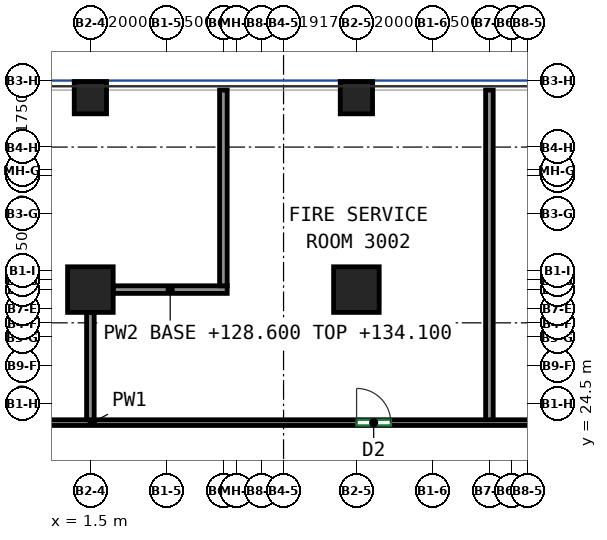
"""IFC4 building model, lengths in metres.
Left out: names, types, materials, properties, quantities, classifications, styles, units other than length and angle.
Written with IfcOpenShell. Run it as: python <this file> out.ifc"""

import sys

from ifc_helpers import new_model, si_unit, direction, frame, frame_2d, origin, origin_2d, place, context, subcontext, project, spatial, rectangle, extrude, source, transform, mapped, element, fill, save


model = new_model("IFC4")
c1 = context("Model", 3, precision=1e-05, world=origin(), true_north=direction((0.0, 1.0)))
c2 = subcontext(c1, "Body", "Model", "MODEL_VIEW")
j1 = project(units=[si_unit("LENGTHUNIT", "METRE"), si_unit("PLANEANGLEUNIT", "RADIAN")], contexts=[c1])
p1 = place(None, origin())
s1 = spatial("IfcSite", under=j1, at=p1, CompositionType="ELEMENT")
p2 = place(p1, origin())
s2 = spatial("IfcBuilding", under=s1, at=p2, CompositionType="ELEMENT")
p3 = place(p2, frame((0.0, 0.0, 128.6)))
s3 = spatial("IfcBuildingStorey", under=s2, at=p3, CompositionType="ELEMENT", Elevation=128.6)
m1 = source(origin(), c2, "Body", "SweptSolid", [
    extrude(rectangle(XDim=1.2, YDim=1.2, at=origin_2d()), origin(), (0.0, 0.0, 1.0), 5.5),
])
p4 = place(p3, frame((1.5, 27.5, 0.0), z_axis=(0.0, 0.0, 1.0), x_axis=(1.0, 0.0, 0.0)))
e1 = element("IfcColumn", 1, at=p4, inside=s3, PredefinedType="COLUMN", context=c2, shape_type="MappedRepresentation", body=[
    mapped(m1, transform((0.0, 0.0, 0.0))),
])
m2 = source(origin(), c2, "Body", "SweptSolid", [
    extrude(rectangle(XDim=0.85, YDim=0.85, at=origin_2d()), origin(), (0.0, 0.0, 1.0), 5.5),
])
p5 = place(p3, frame((1.5, 32.55, 0.0), z_axis=(0.0, 0.0, 1.0), x_axis=(1.0, 0.0, 0.0)))
e2 = element("IfcColumn", 2, at=p5, inside=s3, PredefinedType="COLUMN", context=c2, shape_type="MappedRepresentation", body=[
    mapped(m2, transform((0.0, 0.0, 0.0))),
])
p6 = place(p3, frame((8.5, 27.5, 0.0), z_axis=(0.0, 0.0, 1.0), x_axis=(1.0, 0.0, 0.0)))
e3 = element("IfcColumn", 3, at=p6, inside=s3, PredefinedType="COLUMN", context=c2, shape_type="MappedRepresentation", body=[
    mapped(m1, transform((0.0, 0.0, 0.0))),
])
p7 = place(p3, frame((8.5, 32.55, 0.0), z_axis=(0.0, 0.0, 1.0), x_axis=(1.0, 0.0, 0.0)))
e4 = element("IfcColumn", 4, at=p7, inside=s3, PredefinedType="COLUMN", context=c2, shape_type="MappedRepresentation", body=[
    mapped(m2, transform((0.0, 0.0, 0.0))),
])
p8 = place(p3, frame((-18.075, 24.0, 0.0), z_axis=(0.0, 0.0, 1.0), x_axis=(1.0, 0.0, 0.0)))
e5 = element("IfcWall", 5, at=p8, inside=s3, PredefinedType="PARTITIONING", context=c2, shape_type="SweptSolid", body=[
    extrude(rectangle(XDim=39.25, YDim=0.15, at=frame_2d((19.625, 0.0))), origin(), (0.0, 0.0, 1.0), 9.5),
])
p9 = place(p8, frame((2.109, 0.0, 0.0)))
e6 = element("IfcOpeningElement", 6, at=p9, cuts=e5, PredefinedType="OPENING", context=c2, shape_type="SweptSolid", body=[
    extrude(rectangle(XDim=1.8, YDim=2.1, at=frame_2d((0.9, 1.05))), frame((0.0, 0.085, 0.0), z_axis=(0.0, -1.0, 0.0), x_axis=(1.0, 0.0, 0.0)), (0.0, 0.0, 1.0), 0.17),
])
p10 = place(p8, frame((26.58, 0.0, 0.0)))
e7 = element("IfcOpeningElement", 7, at=p10, cuts=e5, PredefinedType="OPENING", context=c2, shape_type="SweptSolid", body=[
    extrude(rectangle(XDim=0.9, YDim=2.1, at=frame_2d((0.45, 1.05))), frame((0.0, 0.085, 0.0), z_axis=(0.0, -1.0, 0.0), x_axis=(1.0, 0.0, 0.0)), (0.0, 0.0, 1.0), 0.17),
])
p11 = place(p8, frame((36.946, 0.0, 0.0)))
e8 = element("IfcOpeningElement", 8, at=p11, cuts=e5, PredefinedType="OPENING", context=c2, shape_type="SweptSolid", body=[
    extrude(rectangle(XDim=1.8, YDim=2.1, at=frame_2d((0.9, 1.05))), frame((0.0, 0.085, 0.0), z_axis=(0.0, -1.0, 0.0), x_axis=(1.0, 0.0, 0.0)), (0.0, 0.0, 1.0), 0.17),
])
p12 = place(p3, frame((12.0, 24.077, 0.0), z_axis=(0.0, 0.0, 1.0), x_axis=(0.0, 1.0, 0.0)))
e9 = element("IfcWall", 9, at=p12, inside=s3, PredefinedType="PARTITIONING", context=c2, shape_type="SweptSolid", body=[
    extrude(rectangle(XDim=8.673, YDim=0.2, at=frame_2d((4.336, 0.0))), origin(), (0.0, 0.0, 1.0), 9.5),
])
p13 = place(p3, frame((1.5, 24.077, 0.0), z_axis=(0.0, 0.0, 1.0), x_axis=(0.0, 1.0, 0.0)))
e10 = element("IfcWall", 10, at=p13, inside=s3, PredefinedType="PARTITIONING", context=c2, shape_type="SweptSolid", body=[
    extrude(rectangle(XDim=2.823, YDim=0.2, at=frame_2d((1.412, 0.0))), origin(), (0.0, 0.0, 1.0), 9.5),
])
p14 = place(p3, frame((5.1, 27.5, 0.0), z_axis=(0.0, 0.0, 1.0), x_axis=(-1.0, 0.0, 0.0)))
e11 = element("IfcWall", 11, at=p14, inside=s3, PredefinedType="PARTITIONING", context=c2, shape_type="SweptSolid", body=[
    extrude(rectangle(XDim=3.0, YDim=0.2, at=frame_2d((1.5, 0.0))), origin(), (0.0, 0.0, 1.0), 5.5),
])
p15 = place(p3, frame((5.0, 27.6, 0.0), z_axis=(0.0, 0.0, 1.0), x_axis=(0.0, 1.0, 0.0)))
e12 = element("IfcWall", 12, at=p15, inside=s3, PredefinedType="PARTITIONING", context=c2, shape_type="SweptSolid", body=[
    extrude(rectangle(XDim=5.15, YDim=0.2, at=frame_2d((2.575, 0.0))), origin(), (0.0, 0.0, 1.0), 9.5),
])
p16 = place(p10, origin())
e13 = element("IfcDoor", 13, at=p16, inside=s3, OperationType="SINGLE_SWING_LEFT", PredefinedType="DOOR", context=c2, shape_type="SweptSolid", body=[
    extrude(rectangle(XDim=0.9, YDim=2.1, at=frame_2d((0.45, 1.05))), frame((0.0, 0.025, 0.0), z_axis=(0.0, -1.0, 0.0), x_axis=(1.0, 0.0, 0.0)), (0.0, 0.0, 1.0), 0.05),
])
fill(e7, e13)
save(model, sys.argv[1])
